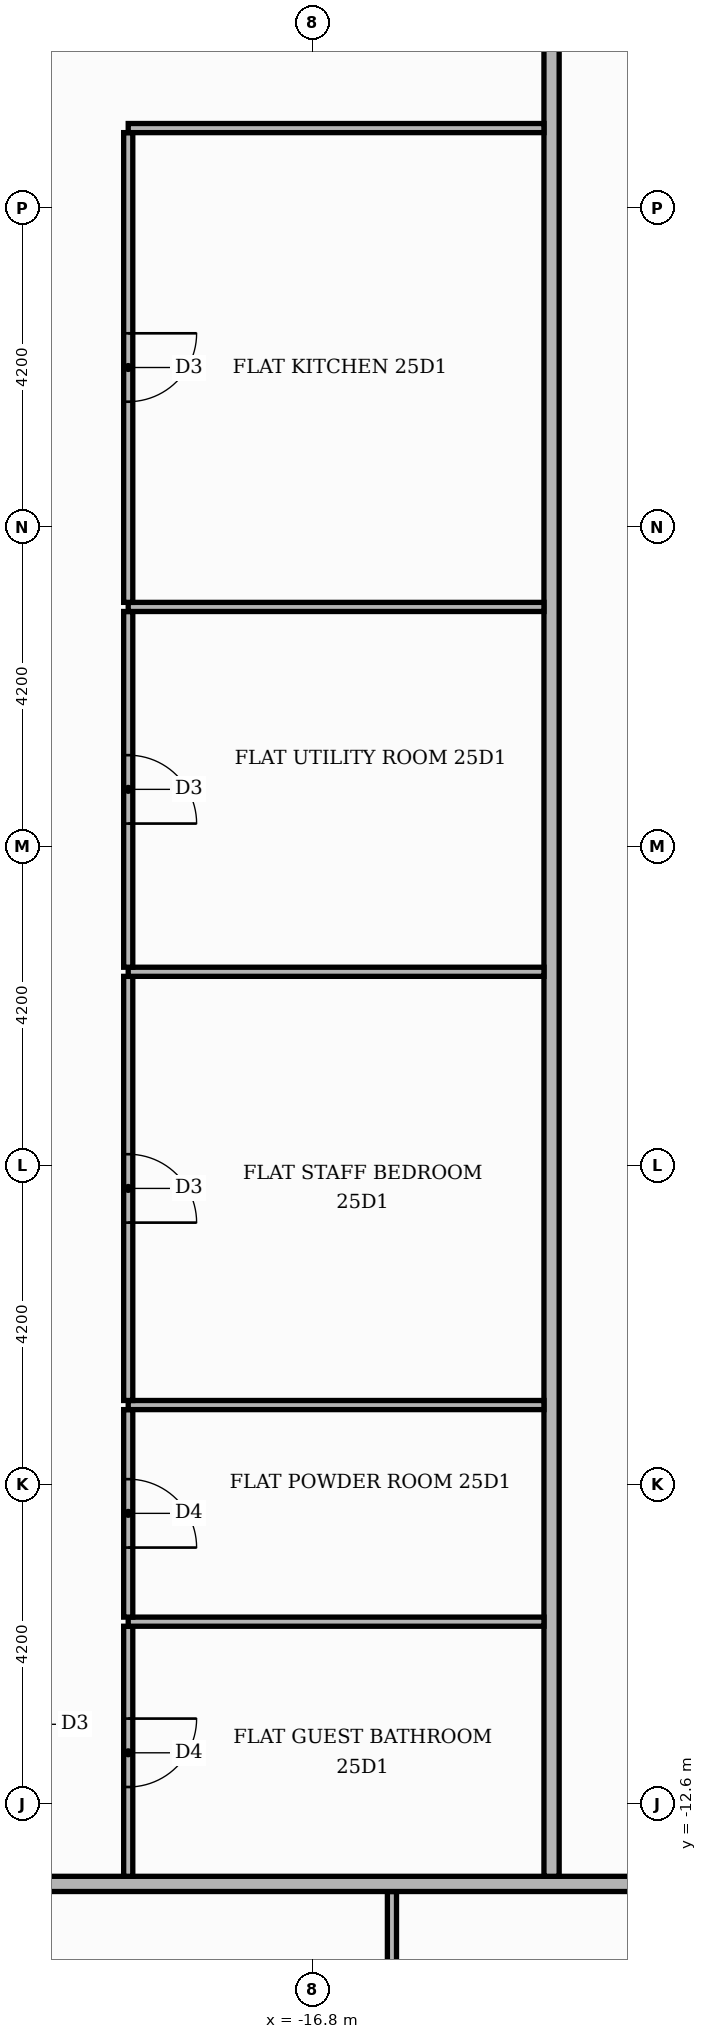
"""IFC4 building model, lengths in metres.
Left out: names, types, materials, properties, quantities, classifications, styles, units other than length and angle.
Written with IfcOpenShell. Run it as: python <this file> out.ifc"""

import sys

from ifc_helpers import new_model, si_unit, direction, frame, frame_2d, origin, place, context, subcontext, project, spatial, rectangle, extrude, element, fill, save


model = new_model("IFC4")
c1 = context("Model", 3, precision=1e-05, world=origin(), true_north=direction((0.0, 1.0)))
c2 = subcontext(c1, "Body", "Model", "MODEL_VIEW")
j1 = project(units=[si_unit("LENGTHUNIT", "METRE"), si_unit("PLANEANGLEUNIT", "RADIAN")], contexts=[c1])
p1 = place(None, origin())
s1 = spatial("IfcSite", under=j1, at=p1, CompositionType="ELEMENT")
p2 = place(p1, origin())
s2 = spatial("IfcBuilding", under=s1, at=p2, CompositionType="ELEMENT")
p3 = place(p2, frame((0.0, 0.0, 106.5)))
s3 = spatial("IfcBuildingStorey", under=s2, at=p3, CompositionType="ELEMENT", Elevation=106.5)
p4 = place(p3, frame((-15.75, -20.66, 0.0), z_axis=(0.0, 0.0, 1.0), x_axis=(0.0, 1.0, 0.0)))
e1 = element("IfcWall", 1, at=p4, inside=s3, PredefinedType="PARTITIONING", context=c2, shape_type="SweptSolid", body=[
    extrude(rectangle(XDim=6.91, YDim=0.12, at=frame_2d((3.455, 0.0))), origin(), (0.0, 0.0, 1.0), 3.48),
])
p5 = place(p4, frame((3.025, 0.0, 0.0)))
e2 = element("IfcOpeningElement", 2, at=p5, cuts=e1, PredefinedType="OPENING", context=c2, shape_type="SweptSolid", body=[
    extrude(rectangle(XDim=0.9, YDim=2.1, at=frame_2d((0.45, 1.05))), frame((0.0, 0.07, 0.0), z_axis=(0.0, -1.0, 0.0), x_axis=(1.0, 0.0, 0.0)), (0.0, 0.0, 1.0), 0.14),
])
p6 = place(p3, frame((-25.42, -13.65, 0.0), z_axis=(0.0, 0.0, 1.0), x_axis=(1.0, 0.0, 0.0)))
e3 = element("IfcWall", 3, at=p6, inside=s3, PredefinedType="PARTITIONING", context=c2, shape_type="SweptSolid", body=[
    extrude(rectangle(XDim=39.07, YDim=0.2, at=frame_2d((19.535, 0.0))), origin(), (0.0, 0.0, 1.0), 3.48),
])
p7 = place(p6, frame((13.32, 0.0, 0.0)))
e4 = element("IfcOpeningElement", 4, at=p7, cuts=e3, PredefinedType="OPENING", context=c2, shape_type="SweptSolid", body=[
    extrude(rectangle(XDim=1.1, YDim=2.4, at=frame_2d((0.55, 1.2))), frame((0.0, 0.11, 0.0), z_axis=(0.0, -1.0, 0.0), x_axis=(1.0, 0.0, 0.0)), (0.0, 0.0, 1.0), 0.22),
])
p8 = place(p3, frame((-19.22, -13.55, 0.0), z_axis=(0.0, 0.0, 1.0), x_axis=(0.0, 1.0, 0.0)))
e5 = element("IfcWall", 5, at=p8, inside=s3, PredefinedType="PARTITIONING", context=c2, shape_type="SweptSolid", body=[
    extrude(rectangle(XDim=3.29, YDim=0.12, at=frame_2d((1.645, 0.0))), origin(), (0.0, 0.0, 1.0), 3.48),
])
p9 = place(p8, frame((1.175, 0.0, 0.0)))
e6 = element("IfcOpeningElement", 6, at=p9, cuts=e5, PredefinedType="OPENING", context=c2, shape_type="SweptSolid", body=[
    extrude(rectangle(XDim=0.9, YDim=2.1, at=frame_2d((0.45, 1.05))), frame((0.0, 0.07, 0.0), z_axis=(0.0, -1.0, 0.0), x_axis=(1.0, 0.0, 0.0)), (0.0, 0.0, 1.0), 0.14),
])
p10 = place(p3, frame((-13.65, -13.55, 0.0), z_axis=(0.0, 0.0, 1.0), x_axis=(0.0, 1.0, 0.0)))
e7 = element("IfcWall", 7, at=p10, inside=s3, PredefinedType="PARTITIONING", context=c2, shape_type="SweptSolid", body=[
    extrude(rectangle(XDim=27.1, YDim=0.2, at=frame_2d((13.55, 0.0))), origin(), (0.0, 0.0, 1.0), 3.48),
])
p11 = place(p10, frame((24.55, 0.0, 0.0)))
e8 = element("IfcOpeningElement", 8, at=p11, cuts=e7, PredefinedType="OPENING", context=c2, shape_type="SweptSolid", body=[
    extrude(rectangle(XDim=1.1, YDim=2.4, at=frame_2d((0.55, 1.2))), frame((0.0, 0.11, 0.0), z_axis=(0.0, -1.0, 0.0), x_axis=(1.0, 0.0, 0.0)), (0.0, 0.0, 1.0), 0.22),
])
p12 = place(p3, frame((-19.22, -10.2, 0.0), z_axis=(0.0, 0.0, 1.0), x_axis=(1.0, 0.0, 0.0)))
e9 = element("IfcWall", 9, at=p12, inside=s3, PredefinedType="PARTITIONING", context=c2, shape_type="SweptSolid", body=[
    extrude(rectangle(XDim=5.47, YDim=0.12, at=frame_2d((2.735, 0.0))), origin(), (0.0, 0.0, 1.0), 3.48),
])
p13 = place(p3, frame((-19.22, -10.14, 0.0), z_axis=(0.0, 0.0, 1.0), x_axis=(0.0, 1.0, 0.0)))
e10 = element("IfcWall", 10, at=p13, inside=s3, PredefinedType="PARTITIONING", context=c2, shape_type="SweptSolid", body=[
    extrude(rectangle(XDim=2.73, YDim=0.12, at=frame_2d((1.365, 0.0))), origin(), (0.0, 0.0, 1.0), 3.48),
])
p14 = place(p13, frame((0.915, 0.0, 0.0)))
e11 = element("IfcOpeningElement", 11, at=p14, cuts=e10, PredefinedType="OPENING", context=c2, shape_type="SweptSolid", body=[
    extrude(rectangle(XDim=0.9, YDim=2.1, at=frame_2d((0.45, 1.05))), frame((0.0, 0.07, 0.0), z_axis=(0.0, -1.0, 0.0), x_axis=(1.0, 0.0, 0.0)), (0.0, 0.0, 1.0), 0.14),
])
p15 = place(p3, frame((-19.22, -7.35, 0.0), z_axis=(0.0, 0.0, 1.0), x_axis=(1.0, 0.0, 0.0)))
e12 = element("IfcWall", 12, at=p15, inside=s3, PredefinedType="PARTITIONING", context=c2, shape_type="SweptSolid", body=[
    extrude(rectangle(XDim=5.47, YDim=0.12, at=frame_2d((2.735, 0.0))), origin(), (0.0, 0.0, 1.0), 3.48),
])
p16 = place(p3, frame((-19.22, -7.29, 0.0), z_axis=(0.0, 0.0, 1.0), x_axis=(0.0, 1.0, 0.0)))
e13 = element("IfcWall", 13, at=p16, inside=s3, PredefinedType="PARTITIONING", context=c2, shape_type="SweptSolid", body=[
    extrude(rectangle(XDim=5.58, YDim=0.12, at=frame_2d((2.79, 0.0))), origin(), (0.0, 0.0, 1.0), 3.48),
])
p17 = place(p16, frame((2.34, 0.0, 0.0)))
e14 = element("IfcOpeningElement", 14, at=p17, cuts=e13, PredefinedType="OPENING", context=c2, shape_type="SweptSolid", body=[
    extrude(rectangle(XDim=0.9, YDim=2.1, at=frame_2d((0.45, 1.05))), frame((0.0, 0.07, 0.0), z_axis=(0.0, -1.0, 0.0), x_axis=(1.0, 0.0, 0.0)), (0.0, 0.0, 1.0), 0.14),
])
p18 = place(p3, frame((-19.22, -1.65, 0.0), z_axis=(0.0, 0.0, 1.0), x_axis=(1.0, 0.0, 0.0)))
e15 = element("IfcWall", 15, at=p18, inside=s3, PredefinedType="PARTITIONING", context=c2, shape_type="SweptSolid", body=[
    extrude(rectangle(XDim=5.47, YDim=0.12, at=frame_2d((2.735, 0.0))), origin(), (0.0, 0.0, 1.0), 3.48),
])
p19 = place(p3, frame((-19.22, -1.59, 0.0), z_axis=(0.0, 0.0, 1.0), x_axis=(0.0, 1.0, 0.0)))
e16 = element("IfcWall", 16, at=p19, inside=s3, PredefinedType="PARTITIONING", context=c2, shape_type="SweptSolid", body=[
    extrude(rectangle(XDim=4.68, YDim=0.12, at=frame_2d((2.34, 0.0))), origin(), (0.0, 0.0, 1.0), 3.48),
])
p20 = place(p19, frame((1.89, 0.0, 0.0)))
e17 = element("IfcOpeningElement", 17, at=p20, cuts=e16, PredefinedType="OPENING", context=c2, shape_type="SweptSolid", body=[
    extrude(rectangle(XDim=0.9, YDim=2.1, at=frame_2d((0.45, 1.05))), frame((0.0, 0.07, 0.0), z_axis=(0.0, -1.0, 0.0), x_axis=(1.0, 0.0, 0.0)), (0.0, 0.0, 1.0), 0.14),
])
p21 = place(p3, frame((-19.22, 3.15, 0.0), z_axis=(0.0, 0.0, 1.0), x_axis=(1.0, 0.0, 0.0)))
e18 = element("IfcWall", 18, at=p21, inside=s3, PredefinedType="PARTITIONING", context=c2, shape_type="SweptSolid", body=[
    extrude(rectangle(XDim=5.47, YDim=0.12, at=frame_2d((2.735, 0.0))), origin(), (0.0, 0.0, 1.0), 3.48),
])
p22 = place(p3, frame((-19.22, 3.21, 0.0), z_axis=(0.0, 0.0, 1.0), x_axis=(0.0, 1.0, 0.0)))
e19 = element("IfcWall", 19, at=p22, inside=s3, PredefinedType="PARTITIONING", context=c2, shape_type="SweptSolid", body=[
    extrude(rectangle(XDim=6.18, YDim=0.12, at=frame_2d((3.09, 0.0))), origin(), (0.0, 0.0, 1.0), 3.48),
])
p23 = place(p22, frame((2.64, 0.0, 0.0)))
e20 = element("IfcOpeningElement", 20, at=p23, cuts=e19, PredefinedType="OPENING", context=c2, shape_type="SweptSolid", body=[
    extrude(rectangle(XDim=0.9, YDim=2.1, at=frame_2d((0.45, 1.05))), frame((0.0, 0.07, 0.0), z_axis=(0.0, -1.0, 0.0), x_axis=(1.0, 0.0, 0.0)), (0.0, 0.0, 1.0), 0.14),
])
p24 = place(p3, frame((-19.22, 9.45, 0.0), z_axis=(0.0, 0.0, 1.0), x_axis=(1.0, 0.0, 0.0)))
e21 = element("IfcWall", 21, at=p24, inside=s3, PredefinedType="PARTITIONING", context=c2, shape_type="SweptSolid", body=[
    extrude(rectangle(XDim=5.47, YDim=0.12, at=frame_2d((2.735, 0.0))), origin(), (0.0, 0.0, 1.0), 3.48),
])
p25 = place(p23, frame((0.9, 0.0, 0.0), z_axis=(0.0, 0.0, 1.0), x_axis=(-1.0, 0.0, 0.0)))
e22 = element("IfcDoor", 22, at=p25, inside=s3, OperationType="SINGLE_SWING_RIGHT", PredefinedType="DOOR", context=c2, shape_type="SweptSolid", body=[
    extrude(rectangle(XDim=0.9, YDim=2.1, at=frame_2d((0.45, 1.05))), frame((0.0, 0.025, 0.0), z_axis=(0.0, -1.0, 0.0), x_axis=(1.0, 0.0, 0.0)), (0.0, 0.0, 1.0), 0.05),
])
fill(e20, e22)
p26 = place(p20, frame((0.9, 0.0, 0.0), z_axis=(0.0, 0.0, 1.0), x_axis=(-1.0, 0.0, 0.0)))
e23 = element("IfcDoor", 23, at=p26, inside=s3, OperationType="SINGLE_SWING_LEFT", PredefinedType="DOOR", context=c2, shape_type="SweptSolid", body=[
    extrude(rectangle(XDim=0.9, YDim=2.1, at=frame_2d((0.45, 1.05))), frame((0.0, 0.025, 0.0), z_axis=(0.0, -1.0, 0.0), x_axis=(1.0, 0.0, 0.0)), (0.0, 0.0, 1.0), 0.05),
])
fill(e17, e23)
p27 = place(p17, frame((0.9, 0.0, 0.0), z_axis=(0.0, 0.0, 1.0), x_axis=(-1.0, 0.0, 0.0)))
e24 = element("IfcDoor", 24, at=p27, inside=s3, OperationType="SINGLE_SWING_LEFT", PredefinedType="DOOR", context=c2, shape_type="SweptSolid", body=[
    extrude(rectangle(XDim=0.9, YDim=2.1, at=frame_2d((0.45, 1.05))), frame((0.0, 0.025, 0.0), z_axis=(0.0, -1.0, 0.0), x_axis=(1.0, 0.0, 0.0)), (0.0, 0.0, 1.0), 0.05),
])
fill(e14, e24)
p28 = place(p14, frame((0.9, 0.0, 0.0), z_axis=(0.0, 0.0, 1.0), x_axis=(-1.0, 0.0, 0.0)))
e25 = element("IfcDoor", 25, at=p28, inside=s3, OperationType="SINGLE_SWING_LEFT", PredefinedType="DOOR", context=c2, shape_type="SweptSolid", body=[
    extrude(rectangle(XDim=0.9, YDim=2.1, at=frame_2d((0.45, 1.05))), frame((0.0, 0.025, 0.0), z_axis=(0.0, -1.0, 0.0), x_axis=(1.0, 0.0, 0.0)), (0.0, 0.0, 1.0), 0.05),
])
fill(e11, e25)
p29 = place(p9, frame((0.9, 0.0, 0.0), z_axis=(0.0, 0.0, 1.0), x_axis=(-1.0, 0.0, 0.0)))
e26 = element("IfcDoor", 26, at=p29, inside=s3, OperationType="SINGLE_SWING_RIGHT", PredefinedType="DOOR", context=c2, shape_type="SweptSolid", body=[
    extrude(rectangle(XDim=0.9, YDim=2.1, at=frame_2d((0.45, 1.05))), frame((0.0, 0.025, 0.0), z_axis=(0.0, -1.0, 0.0), x_axis=(1.0, 0.0, 0.0)), (0.0, 0.0, 1.0), 0.05),
])
fill(e6, e26)
save(model, sys.argv[1])
